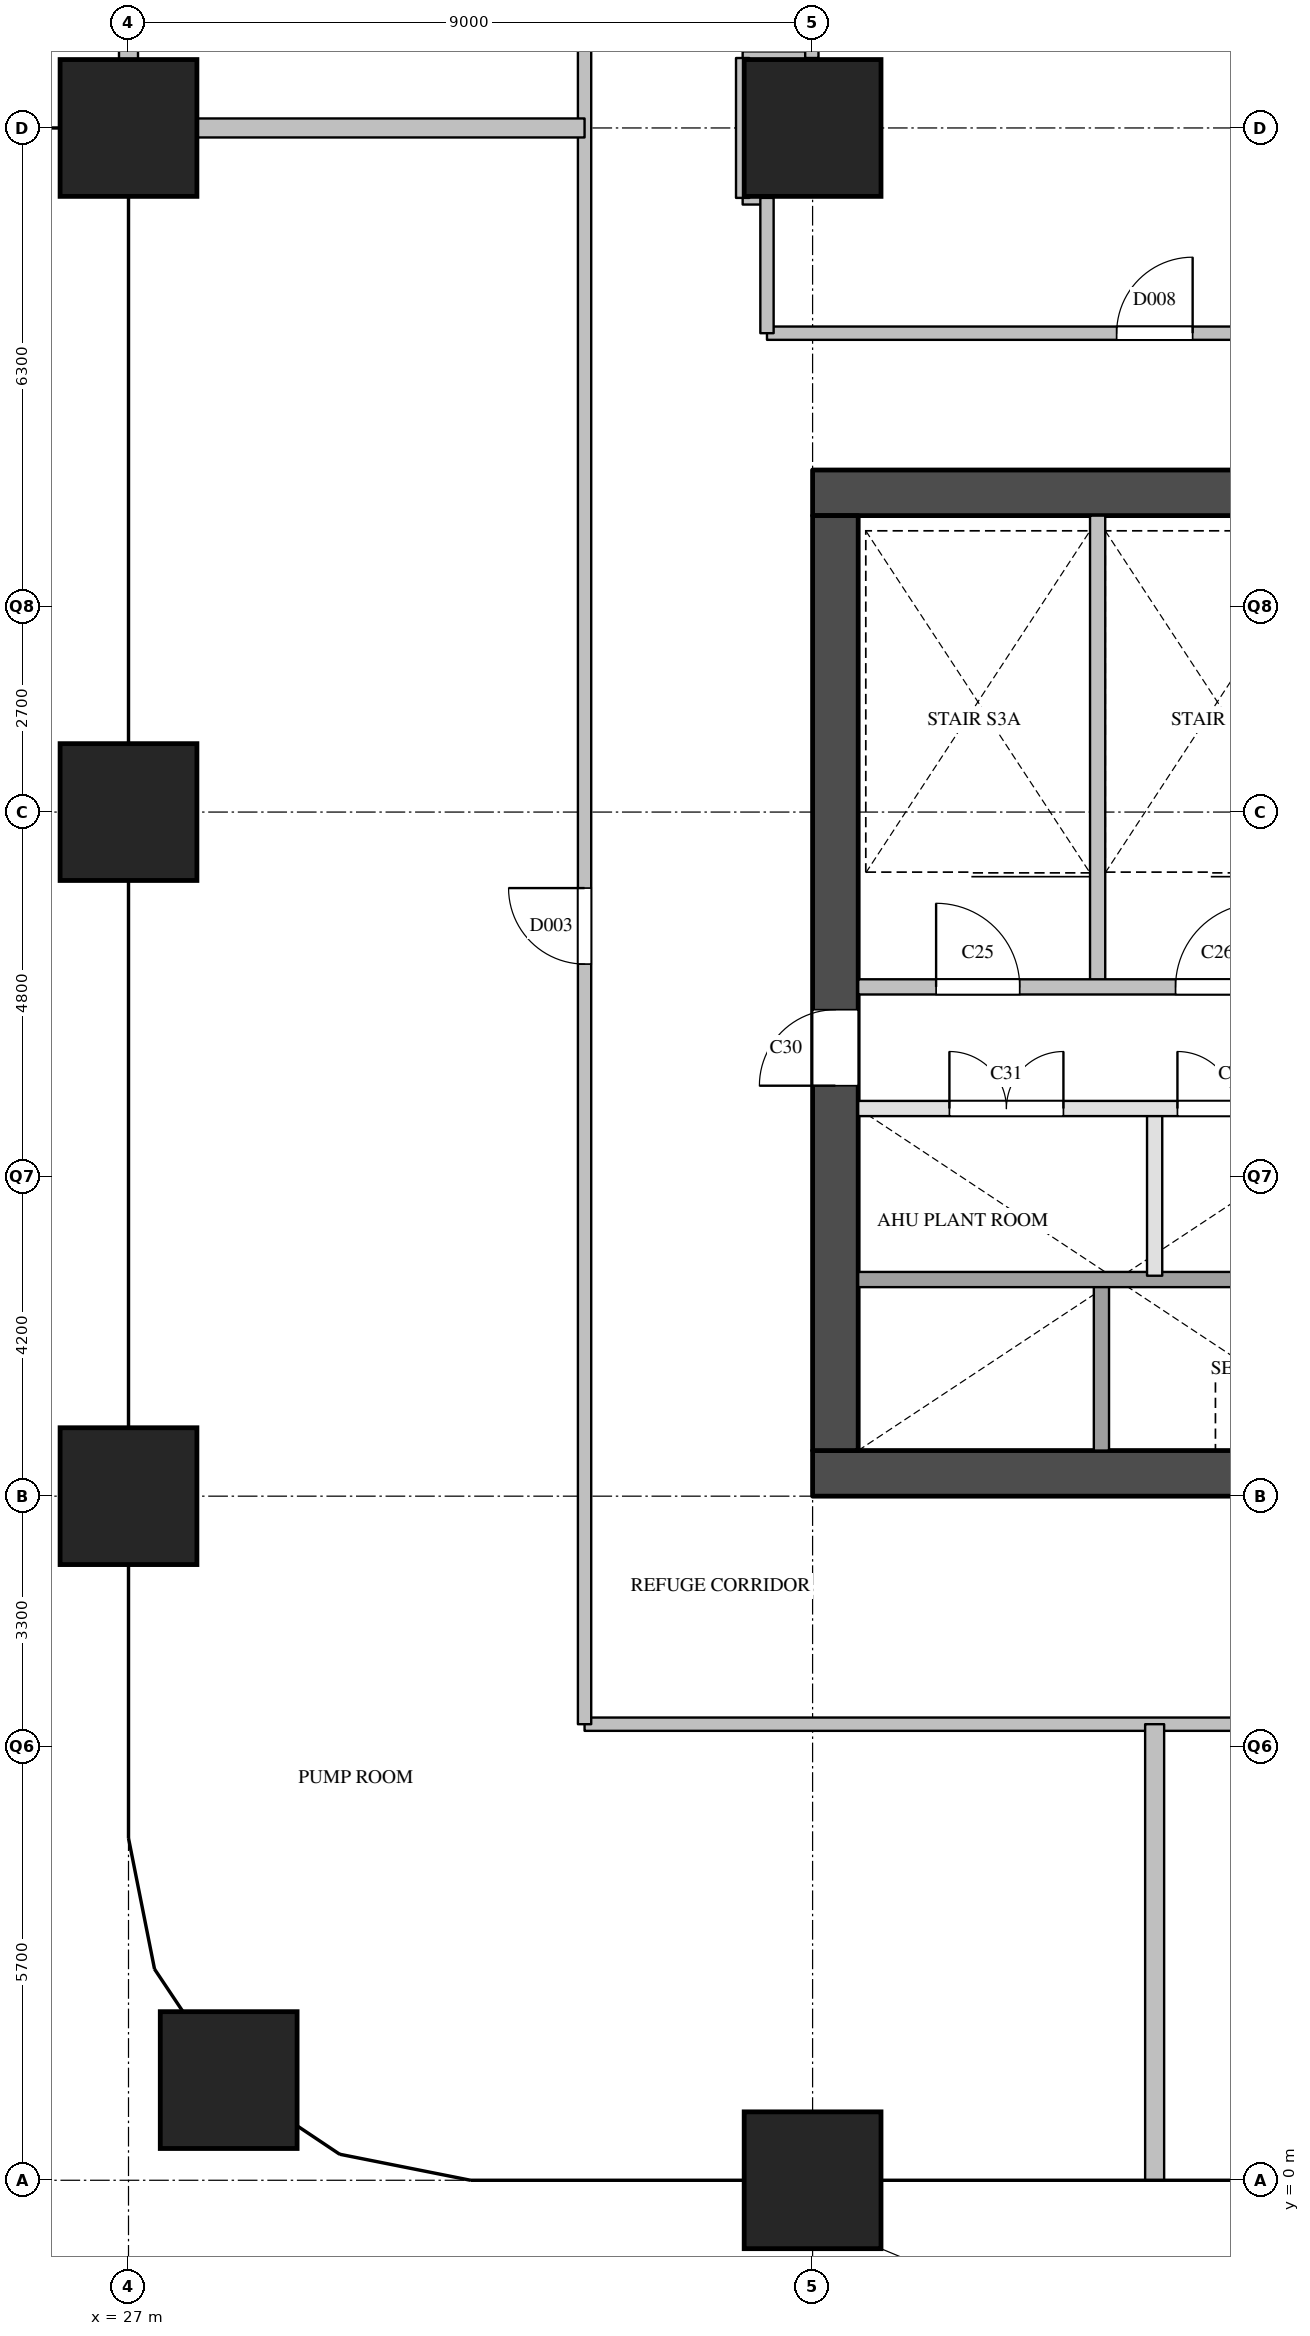
"""IFC4 building model, lengths in metres.
Left out: names, types, materials, properties, quantities, classifications, styles, units other than length and angle.
Written with IfcOpenShell. Run it as: python <this file> out.ifc"""

import sys

from ifc_helpers import new_model, si_unit, direction, frame, frame_2d, origin, origin_2d, place, context, subcontext, project, spatial, rectangle, extrude, element, fill, save


model = new_model("IFC4")
c1 = context("Model", 3, precision=1e-05, world=origin(), true_north=direction((0.0, 1.0)))
c2 = subcontext(c1, "Body", "Model", "MODEL_VIEW")
j1 = project(units=[si_unit("LENGTHUNIT", "METRE"), si_unit("PLANEANGLEUNIT", "RADIAN")], contexts=[c1])
p1 = place(None, origin())
s1 = spatial("IfcSite", under=j1, at=p1, CompositionType="ELEMENT")
p2 = place(p1, origin())
s2 = spatial("IfcBuilding", under=s1, at=p2, CompositionType="ELEMENT")
p3 = place(p2, frame((0.0, 0.0, 123.4)))
s3 = spatial("IfcBuildingStorey", under=s2, at=p3, CompositionType="ELEMENT", Elevation=123.4)
for number, where, z_axis, x_axis in (
    (1, (28.318, 1.318, 0.0), (0.0, 0.0, 1.0), (1.0, 0.0, 0.0)),
    (2, (27.0, 9.0, 0.0), (0.0, 0.0, 1.0), (1.0, 0.0, 0.0)),
    (3, (27.0, 18.0, 0.0), (0.0, 0.0, 1.0), (1.0, 0.0, 0.0)),
    (4, (27.0, 27.0, 0.0), (0.0, 0.0, 1.0), (1.0, 0.0, 0.0)),
    (5, (36.0, 0.0, 0.0), (0.0, 0.0, 1.0), (1.0, 0.0, 0.0)),
    (6, (36.0, 27.0, 0.0), (0.0, 0.0, 1.0), (1.0, 0.0, 0.0)),
):
    element("IfcColumn", number, at=place(p3, frame(where, z_axis=z_axis, x_axis=x_axis)), inside=s3, PredefinedType="COLUMN", context=c2, shape_type="SweptSolid", body=[
        extrude(rectangle(XDim=1.8, YDim=1.8, at=origin_2d()), origin(), (0.0, 0.0, 1.0), 6.0),
    ])
for number, where, z_axis, x_axis in (
    (7, (36.0, 9.3, 0.0), (0.0, 0.0, 1.0), (1.0, 0.0, 0.0)),
    (8, (36.0, 22.2, 0.0), (0.0, 0.0, 1.0), (1.0, 0.0, 0.0)),
):
    element("IfcWall", number, at=place(p3, frame(where, z_axis=z_axis, x_axis=x_axis)), inside=s3, PredefinedType="SHEAR", context=c2, shape_type="SweptSolid", body=[
        extrude(rectangle(XDim=9.0, YDim=0.6, at=frame_2d((4.5, 0.0))), origin(), (0.0, 0.0, 1.0), 5.7),
    ])
p4 = place(p3, frame((36.3, 9.6, 0.0), z_axis=(0.0, 0.0, 1.0), x_axis=(0.0, 1.0, 0.0)))
e9 = element("IfcWall", 9, at=p4, inside=s3, PredefinedType="SHEAR", context=c2, shape_type="SweptSolid", body=[
    extrude(rectangle(XDim=12.3, YDim=0.6, at=frame_2d((6.15, 0.0))), origin(), (0.0, 0.0, 1.0), 5.7),
])
p5 = place(p4, frame((4.8, 0.0, 0.0)))
e10 = element("IfcOpeningElement", 10, at=p5, cuts=e9, PredefinedType="OPENING", context=c2, shape_type="SweptSolid", body=[
    extrude(rectangle(XDim=1.0, YDim=2.1, at=frame_2d((0.5, 1.05))), frame((0.0, 0.31, 0.0), z_axis=(0.0, -1.0, 0.0), x_axis=(1.0, 0.0, 0.0)), (0.0, 0.0, 1.0), 0.62),
])
p6 = place(p3, frame((39.75, 15.7, 0.0), z_axis=(0.0, 0.0, 1.0), x_axis=(0.0, 1.0, 0.0)))
e11 = element("IfcWall", 11, at=p6, inside=s3, PredefinedType="SOLIDWALL", context=c2, shape_type="SweptSolid", body=[
    extrude(rectangle(XDim=6.2, YDim=0.2, at=frame_2d((3.1, 0.0))), origin(), (0.0, 0.0, 1.0), 5.7),
])
p7 = place(p3, frame((39.8, 9.6, 0.0), z_axis=(0.0, 0.0, 1.0), x_axis=(0.0, 1.0, 0.0)))
e12 = element("IfcWall", 12, at=p7, inside=s3, PredefinedType="SOLIDWALL", context=c2, shape_type="SweptSolid", body=[
    extrude(rectangle(XDim=2.3, YDim=0.2, at=frame_2d((1.15, 0.0))), origin(), (0.0, 0.0, 1.0), 5.7),
])
p8 = place(p3, frame((40.5, 11.9, 0.0), z_axis=(0.0, 0.0, 1.0), x_axis=(0.0, 1.0, 0.0)))
e13 = element("IfcWall", 13, at=p8, inside=s3, PredefinedType="PARTITIONING", context=c2, shape_type="SweptSolid", body=[
    extrude(rectangle(XDim=2.2, YDim=0.2, at=frame_2d((1.1, 0.0))), origin(), (0.0, 0.0, 1.0), 5.7),
])
p9 = place(p3, frame((36.6, 11.85, 0.0), z_axis=(0.0, 0.0, 1.0), x_axis=(1.0, 0.0, 0.0)))
e14 = element("IfcWall", 14, at=p9, inside=s3, PredefinedType="SOLIDWALL", context=c2, shape_type="SweptSolid", body=[
    extrude(rectangle(XDim=7.8, YDim=0.2, at=frame_2d((3.9, 0.0))), origin(), (0.0, 0.0, 1.0), 5.7),
])
p10 = place(p3, frame((36.6, 14.1, 0.0), z_axis=(0.0, 0.0, 1.0), x_axis=(1.0, 0.0, 0.0)))
e15 = element("IfcWall", 15, at=p10, inside=s3, PredefinedType="PARTITIONING", context=c2, shape_type="SweptSolid", body=[
    extrude(rectangle(XDim=6.0, YDim=0.2, at=frame_2d((3.0, 0.0))), origin(), (0.0, 0.0, 1.0), 5.7),
])
p11 = place(p10, frame((1.2, 0.0, 0.0)))
e16 = element("IfcOpeningElement", 16, at=p11, cuts=e15, PredefinedType="OPENING", context=c2, shape_type="SweptSolid", body=[
    extrude(rectangle(XDim=1.5, YDim=2.1, at=frame_2d((0.75, 1.05))), frame((0.0, 0.11, 0.0), z_axis=(0.0, -1.0, 0.0), x_axis=(1.0, 0.0, 0.0)), (0.0, 0.0, 1.0), 0.22),
])
p12 = place(p10, frame((4.2, 0.0, 0.0)))
e17 = element("IfcOpeningElement", 17, at=p12, cuts=e15, PredefinedType="OPENING", context=c2, shape_type="SweptSolid", body=[
    extrude(rectangle(XDim=1.5, YDim=2.1, at=frame_2d((0.75, 1.05))), frame((0.0, 0.11, 0.0), z_axis=(0.0, -1.0, 0.0), x_axis=(1.0, 0.0, 0.0)), (0.0, 0.0, 1.0), 0.22),
])
p13 = place(p3, frame((36.6, 15.7, 0.0), z_axis=(0.0, 0.0, 1.0), x_axis=(1.0, 0.0, 0.0)))
e18 = element("IfcWall", 18, at=p13, inside=s3, PredefinedType="SOLIDWALL", context=c2, shape_type="SweptSolid", body=[
    extrude(rectangle(XDim=6.3, YDim=0.2, at=frame_2d((3.15, 0.0))), origin(), (0.0, 0.0, 1.0), 5.7),
])
p14 = place(p13, frame((1.025, 0.0, 0.0)))
e19 = element("IfcOpeningElement", 19, at=p14, cuts=e18, PredefinedType="OPENING", context=c2, shape_type="SweptSolid", body=[
    extrude(rectangle(XDim=1.1, YDim=2.1, at=frame_2d((0.55, 1.05))), frame((0.0, 0.11, 0.0), z_axis=(0.0, -1.0, 0.0), x_axis=(1.0, 0.0, 0.0)), (0.0, 0.0, 1.0), 0.22),
])
p15 = place(p13, frame((4.175, 0.0, 0.0)))
e20 = element("IfcOpeningElement", 20, at=p15, cuts=e18, PredefinedType="OPENING", context=c2, shape_type="SweptSolid", body=[
    extrude(rectangle(XDim=1.1, YDim=2.1, at=frame_2d((0.55, 1.05))), frame((0.0, 0.11, 0.0), z_axis=(0.0, -1.0, 0.0), x_axis=(1.0, 0.0, 0.0)), (0.0, 0.0, 1.0), 0.22),
])
p16 = place(p3, frame((33.0, 6.0, 0.0), z_axis=(0.0, 0.0, 1.0), x_axis=(1.0, 0.0, 0.0)))
e21 = element("IfcWall", 21, at=p16, inside=s3, PredefinedType="PARTITIONING", context=c2, shape_type="SweptSolid", body=[
    extrude(rectangle(XDim=15.0, YDim=0.175, at=frame_2d((7.5, 0.0))), origin(), (0.0, 0.0, 1.0), 5.7),
])
p17 = place(p3, frame((35.4, 24.3, 0.0), z_axis=(0.0, 0.0, 1.0), x_axis=(1.0, 0.0, 0.0)))
e22 = element("IfcWall", 22, at=p17, inside=s3, PredefinedType="PARTITIONING", context=c2, shape_type="SweptSolid", body=[
    extrude(rectangle(XDim=10.2, YDim=0.175, at=frame_2d((5.1, 0.0))), origin(), (0.0, 0.0, 1.0), 5.7),
])
p18 = place(p17, frame((4.6, 0.0, 0.0)))
e23 = element("IfcOpeningElement", 23, at=p18, cuts=e22, PredefinedType="OPENING", context=c2, shape_type="SweptSolid", body=[
    extrude(rectangle(XDim=1.0, YDim=2.1, at=frame_2d((0.5, 1.05))), frame((0.0, 0.097, 0.0), z_axis=(0.0, -1.0, 0.0), x_axis=(1.0, 0.0, 0.0)), (0.0, 0.0, 1.0), 0.195),
])
p19 = place(p3, frame((35.08, 26.08, 0.0), z_axis=(0.0, 0.0, 1.0), x_axis=(1.0, 0.0, 0.0)))
e24 = element("IfcWall", 24, at=p19, inside=s3, PredefinedType="PARTITIONING", context=c2, shape_type="SweptSolid", body=[
    extrude(rectangle(XDim=0.32, YDim=0.175, at=frame_2d((0.16, 0.0))), origin(), (0.0, 0.0, 1.0), 5.7),
])
p20 = place(p3, frame((35.08, 27.92, 0.0), z_axis=(0.0, 0.0, 1.0), x_axis=(1.0, 0.0, 0.0)))
e25 = element("IfcWall", 25, at=p20, inside=s3, PredefinedType="PARTITIONING", context=c2, shape_type="SweptSolid", body=[
    extrude(rectangle(XDim=0.91, YDim=0.175, at=frame_2d((0.455, 0.0))), origin(), (0.0, 0.0, 1.0), 5.7),
])
p21 = place(p3, frame((33.0, 6.0, 0.0), z_axis=(0.0, 0.0, 1.0), x_axis=(0.0, 1.0, 0.0)))
e26 = element("IfcWall", 26, at=p21, inside=s3, PredefinedType="PARTITIONING", context=c2, shape_type="SweptSolid", body=[
    extrude(rectangle(XDim=27.0, YDim=0.175, at=frame_2d((13.5, 0.0))), origin(), (0.0, 0.0, 1.0), 5.7),
])
p22 = place(p21, frame((10.0, 0.0, 0.0)))
e27 = element("IfcOpeningElement", 27, at=p22, cuts=e26, PredefinedType="OPENING", context=c2, shape_type="SweptSolid", body=[
    extrude(rectangle(XDim=1.0, YDim=2.1, at=frame_2d((0.5, 1.05))), frame((0.0, 0.097, 0.0), z_axis=(0.0, -1.0, 0.0), x_axis=(1.0, 0.0, 0.0)), (0.0, 0.0, 1.0), 0.195),
])
p23 = place(p21, frame((23.5, 0.0, 0.0)))
e28 = element("IfcOpeningElement", 28, at=p23, cuts=e26, PredefinedType="OPENING", context=c2, shape_type="SweptSolid", body=[
    extrude(rectangle(XDim=1.0, YDim=2.1, at=frame_2d((0.5, 1.05))), frame((0.0, 0.097, 0.0), z_axis=(0.0, -1.0, 0.0), x_axis=(1.0, 0.0, 0.0)), (0.0, 0.0, 1.0), 0.195),
])
p24 = place(p3, frame((35.08, 26.08, 0.0), z_axis=(0.0, 0.0, 1.0), x_axis=(0.0, 1.0, 0.0)))
e29 = element("IfcWall", 29, at=p24, inside=s3, PredefinedType="PARTITIONING", context=c2, shape_type="SweptSolid", body=[
    extrude(rectangle(XDim=1.84, YDim=0.175, at=frame_2d((0.92, 0.0))), origin(), (0.0, 0.0, 1.0), 5.7),
])
p25 = place(p3, frame((35.4, 24.3, 0.0), z_axis=(0.0, 0.0, 1.0), x_axis=(0.0, 1.0, 0.0)))
e30 = element("IfcWall", 30, at=p25, inside=s3, PredefinedType="PARTITIONING", context=c2, shape_type="SweptSolid", body=[
    extrude(rectangle(XDim=1.78, YDim=0.175, at=frame_2d((0.89, 0.0))), origin(), (0.0, 0.0, 1.0), 5.7),
])
p26 = place(p3, frame((35.99, 27.92, 0.0), z_axis=(0.0, 0.0, 1.0), x_axis=(0.0, 1.0, 0.0)))
e31 = element("IfcWall", 31, at=p26, inside=s3, PredefinedType="PARTITIONING", context=c2, shape_type="SweptSolid", body=[
    extrude(rectangle(XDim=0.6, YDim=0.175, at=frame_2d((0.3, 0.0))), origin(), (0.0, 0.0, 1.0), 5.7),
])
p27 = place(p3, frame((26.875, 27.0, 0.0), z_axis=(0.0, 0.0, 1.0), x_axis=(1.0, 0.0, 0.0)))
e32 = element("IfcWall", 32, at=p27, inside=s3, PredefinedType="PARTITIONING", context=c2, shape_type="SweptSolid", body=[
    extrude(rectangle(XDim=6.125, YDim=0.25, at=frame_2d((3.062, 0.0))), origin(), (0.0, 0.0, 1.0), 5.7),
])
p28 = place(p3, frame((27.0, 27.125, 0.0), z_axis=(0.0, 0.0, 1.0), x_axis=(0.0, 1.0, 0.0)))
e33 = element("IfcWall", 33, at=p28, inside=s3, PredefinedType="PARTITIONING", context=c2, shape_type="SweptSolid", body=[
    extrude(rectangle(XDim=5.875, YDim=0.25, at=frame_2d((2.938, 0.0))), origin(), (0.0, 0.0, 1.0), 5.7),
])
p29 = place(p3, frame((40.5, 0.0, 0.0), z_axis=(0.0, 0.0, 1.0), x_axis=(0.0, 1.0, 0.0)))
e34 = element("IfcWall", 34, at=p29, inside=s3, PredefinedType="PARTITIONING", context=c2, shape_type="SweptSolid", body=[
    extrude(rectangle(XDim=6.0, YDim=0.25, at=frame_2d((3.0, 0.0))), origin(), (0.0, 0.0, 1.0), 5.7),
])
p30 = place(p14, origin())
e35 = element("IfcDoor", 35, at=p30, inside=s3, OperationType="SINGLE_SWING_LEFT", PredefinedType="DOOR", context=c2, shape_type="SweptSolid", body=[
    extrude(rectangle(XDim=1.1, YDim=2.1, at=frame_2d((0.55, 1.05))), frame((0.0, 0.025, 0.0), z_axis=(0.0, -1.0, 0.0), x_axis=(1.0, 0.0, 0.0)), (0.0, 0.0, 1.0), 0.05),
])
fill(e19, e35)
p31 = place(p15, origin())
e36 = element("IfcDoor", 36, at=p31, inside=s3, OperationType="SINGLE_SWING_RIGHT", PredefinedType="DOOR", context=c2, shape_type="SweptSolid", body=[
    extrude(rectangle(XDim=1.1, YDim=2.1, at=frame_2d((0.55, 1.05))), frame((0.0, 0.025, 0.0), z_axis=(0.0, -1.0, 0.0), x_axis=(1.0, 0.0, 0.0)), (0.0, 0.0, 1.0), 0.05),
])
fill(e20, e36)
p32 = place(p5, origin())
e37 = element("IfcDoor", 37, at=p32, inside=s3, OperationType="SINGLE_SWING_LEFT", PredefinedType="DOOR", context=c2, shape_type="SweptSolid", body=[
    extrude(rectangle(XDim=1.0, YDim=2.1, at=frame_2d((0.5, 1.05))), frame((0.0, 0.025, 0.0), z_axis=(0.0, -1.0, 0.0), x_axis=(1.0, 0.0, 0.0)), (0.0, 0.0, 1.0), 0.05),
])
fill(e10, e37)
p33 = place(p11, origin())
e38 = element("IfcDoor", 38, at=p33, inside=s3, OperationType="DOUBLE_DOOR_SINGLE_SWING", PredefinedType="DOOR", context=c2, shape_type="SweptSolid", body=[
    extrude(rectangle(XDim=1.5, YDim=2.1, at=frame_2d((0.75, 1.05))), frame((0.0, 0.025, 0.0), z_axis=(0.0, -1.0, 0.0), x_axis=(1.0, 0.0, 0.0)), (0.0, 0.0, 1.0), 0.05),
])
fill(e16, e38)
p34 = place(p12, origin())
e39 = element("IfcDoor", 39, at=p34, inside=s3, OperationType="DOUBLE_DOOR_SINGLE_SWING", PredefinedType="DOOR", context=c2, shape_type="SweptSolid", body=[
    extrude(rectangle(XDim=1.5, YDim=2.1, at=frame_2d((0.75, 1.05))), frame((0.0, 0.025, 0.0), z_axis=(0.0, -1.0, 0.0), x_axis=(1.0, 0.0, 0.0)), (0.0, 0.0, 1.0), 0.05),
])
fill(e17, e39)
p35 = place(p22, origin())
e40 = element("IfcDoor", 40, at=p35, inside=s3, OperationType="SINGLE_SWING_RIGHT", PredefinedType="DOOR", context=c2, shape_type="SweptSolid", body=[
    extrude(rectangle(XDim=1.0, YDim=2.1, at=frame_2d((0.5, 1.05))), frame((0.0, 0.025, 0.0), z_axis=(0.0, -1.0, 0.0), x_axis=(1.0, 0.0, 0.0)), (0.0, 0.0, 1.0), 0.05),
])
fill(e27, e40)
p36 = place(p18, origin())
e41 = element("IfcDoor", 41, at=p36, inside=s3, OperationType="SINGLE_SWING_RIGHT", PredefinedType="DOOR", context=c2, shape_type="SweptSolid", body=[
    extrude(rectangle(XDim=1.0, YDim=2.1, at=frame_2d((0.5, 1.05))), frame((0.0, 0.025, 0.0), z_axis=(0.0, -1.0, 0.0), x_axis=(1.0, 0.0, 0.0)), (0.0, 0.0, 1.0), 0.05),
])
fill(e23, e41)
save(model, sys.argv[1])
